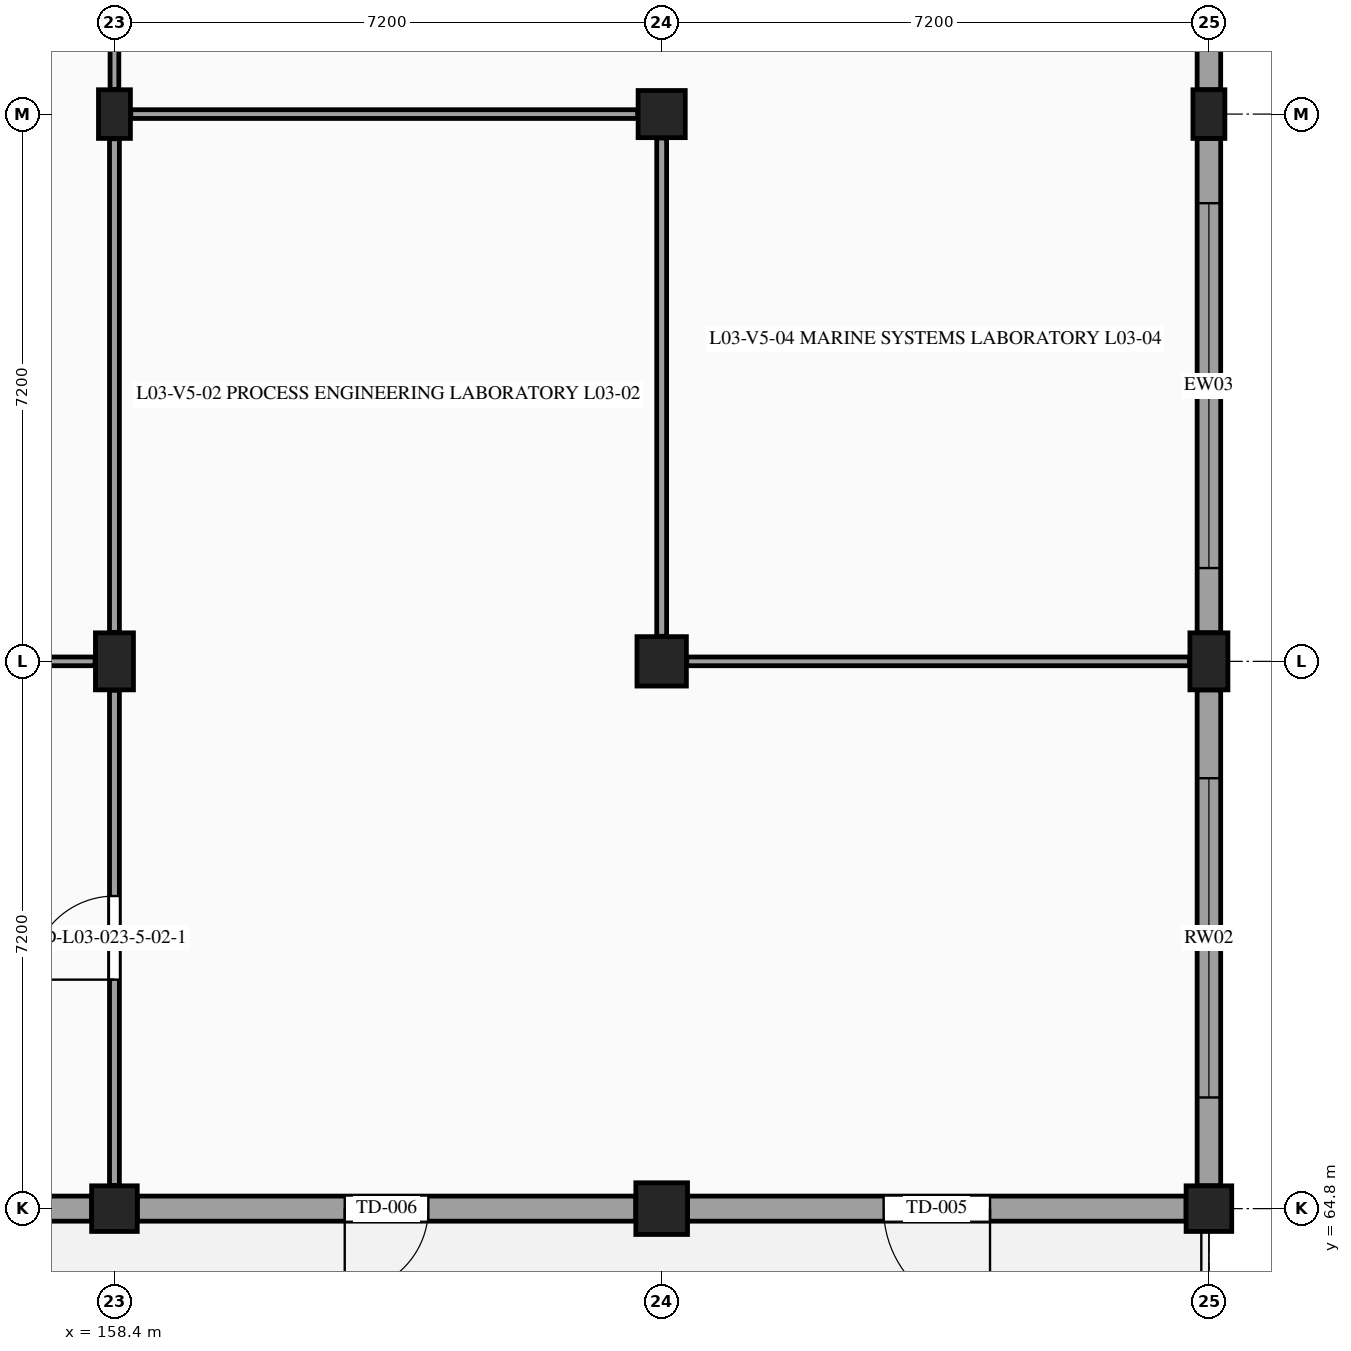
"""IFC4 building model, lengths in metres.
Left out: names, types, materials, properties, quantities, classifications, styles, units other than length and angle.
Written with IfcOpenShell. Run it as: python <this file> out.ifc"""

import sys

from ifc_helpers import new_model, si_unit, direction, frame, frame_2d, origin, origin_2d, place, context, subcontext, project, spatial, rectangle, extrude, element, fill, save


model = new_model("IFC4")
c1 = context("Model", 3, precision=1e-05, world=origin(), true_north=direction((0.0, 1.0)))
c2 = subcontext(c1, "Body", "Model", "MODEL_VIEW")
j1 = project(units=[si_unit("LENGTHUNIT", "METRE"), si_unit("PLANEANGLEUNIT", "RADIAN")], contexts=[c1])
p1 = place(None, origin())
s1 = spatial("IfcSite", under=j1, at=p1, CompositionType="ELEMENT")
p2 = place(p1, origin())
s2 = spatial("IfcBuilding", under=s1, at=p2, CompositionType="ELEMENT")
p3 = place(p2, frame((0.0, 0.0, 14.4)))
s3 = spatial("IfcBuildingStorey", under=s2, at=p3, CompositionType="ELEMENT", Elevation=14.4)
p4 = place(p3, frame((158.4, 64.8, 0.0), z_axis=(0.0, 0.0, 1.0), x_axis=(1.0, 0.0, 0.0)))
e1 = element("IfcColumn", 1, at=p4, inside=s3, PredefinedType="COLUMN", context=c2, shape_type="SweptSolid", body=[
    extrude(rectangle(XDim=0.6, YDim=0.6, at=origin_2d()), origin(), (0.0, 0.0, 1.0), 4.2),
])
p5 = place(p3, frame((158.4, 72.0, 0.0), z_axis=(0.0, 0.0, 1.0), x_axis=(1.0, 0.0, 0.0)))
e2 = element("IfcColumn", 2, at=p5, inside=s3, PredefinedType="COLUMN", context=c2, shape_type="SweptSolid", body=[
    extrude(rectangle(XDim=0.5, YDim=0.75, at=origin_2d()), origin(), (0.0, 0.0, 1.0), 4.2),
])
p6 = place(p3, frame((158.4, 79.2, 0.0), z_axis=(0.0, 0.0, 1.0), x_axis=(1.0, 0.0, 0.0)))
e3 = element("IfcColumn", 3, at=p6, inside=s3, PredefinedType="PILASTER", context=c2, shape_type="SweptSolid", body=[
    extrude(rectangle(XDim=0.42, YDim=0.64, at=origin_2d()), origin(), (0.0, 0.0, 1.0), 4.2),
])
p7 = place(p3, frame((165.6, 64.8, 0.0), z_axis=(0.0, 0.0, 1.0), x_axis=(1.0, 0.0, 0.0)))
e4 = element("IfcColumn", 4, at=p7, inside=s3, PredefinedType="COLUMN", context=c2, shape_type="SweptSolid", body=[
    extrude(rectangle(XDim=0.68, YDim=0.68, at=origin_2d()), origin(), (0.0, 0.0, 1.0), 4.2),
])
p8 = place(p3, frame((165.6, 72.0, 0.0), z_axis=(0.0, 0.0, 1.0), x_axis=(1.0, 0.0, 0.0)))
e5 = element("IfcColumn", 5, at=p8, inside=s3, PredefinedType="COLUMN", context=c2, shape_type="SweptSolid", body=[
    extrude(rectangle(XDim=0.65, YDim=0.65, at=origin_2d()), origin(), (0.0, 0.0, 1.0), 4.2),
])
p9 = place(p3, frame((165.6, 79.2, 0.0), z_axis=(0.0, 0.0, 1.0), x_axis=(1.0, 0.0, 0.0)))
e6 = element("IfcColumn", 6, at=p9, inside=s3, PredefinedType="COLUMN", context=c2, shape_type="SweptSolid", body=[
    extrude(rectangle(XDim=0.62, YDim=0.62, at=origin_2d()), origin(), (0.0, 0.0, 1.0), 4.2),
])
p10 = place(p3, frame((172.8, 64.8, 0.0), z_axis=(0.0, 0.0, 1.0), x_axis=(1.0, 0.0, 0.0)))
e7 = element("IfcColumn", 7, at=p10, inside=s3, PredefinedType="COLUMN", context=c2, shape_type="SweptSolid", body=[
    extrude(rectangle(XDim=0.6, YDim=0.6, at=origin_2d()), origin(), (0.0, 0.0, 1.0), 4.2),
])
p11 = place(p3, frame((172.8, 72.0, 0.0), z_axis=(0.0, 0.0, 1.0), x_axis=(1.0, 0.0, 0.0)))
e8 = element("IfcColumn", 8, at=p11, inside=s3, PredefinedType="COLUMN", context=c2, shape_type="SweptSolid", body=[
    extrude(rectangle(XDim=0.5, YDim=0.75, at=origin_2d()), origin(), (0.0, 0.0, 1.0), 4.2),
])
p12 = place(p3, frame((172.8, 79.2, 0.0), z_axis=(0.0, 0.0, 1.0), x_axis=(1.0, 0.0, 0.0)))
e9 = element("IfcColumn", 9, at=p12, inside=s3, PredefinedType="PILASTER", context=c2, shape_type="SweptSolid", body=[
    extrude(rectangle(XDim=0.42, YDim=0.64, at=origin_2d()), origin(), (0.0, 0.0, 1.0), 4.2),
])
p13 = place(p3, frame((172.8, 86.06, 0.0), z_axis=(0.0, 0.0, 1.0), x_axis=(0.0, -1.0, 0.0)))
e10 = element("IfcWall", 10, at=p13, inside=s3, PredefinedType="STANDARD", context=c2, shape_type="SweptSolid", body=[
    extrude(rectangle(XDim=6.54, YDim=0.31, at=frame_2d((3.27, 0.0))), origin(), (0.0, 0.0, 1.0), 3.135),
])
p14 = place(p13, frame((2.22, 0.0, 0.98)))
e11 = element("IfcOpeningElement", 11, at=p14, cuts=e10, PredefinedType="OPENING", context=c2, shape_type="SweptSolid", body=[
    extrude(rectangle(XDim=2.1, YDim=1.3, at=frame_2d((1.05, 0.65))), frame((0.0, 0.165, 0.0), z_axis=(0.0, -1.0, 0.0), x_axis=(1.0, 0.0, 0.0)), (0.0, 0.0, 1.0), 0.33),
])
p15 = place(p3, frame((172.8, 78.88, 0.0), z_axis=(0.0, 0.0, 1.0), x_axis=(0.0, -1.0, 0.0)))
e12 = element("IfcWall", 12, at=p15, inside=s3, PredefinedType="STANDARD", context=c2, shape_type="SweptSolid", body=[
    extrude(rectangle(XDim=6.505, YDim=0.31, at=frame_2d((3.252, 0.0))), origin(), (0.0, 0.0, 1.0), 3.135),
])
p16 = place(p15, frame((0.853, 0.0, 0.98)))
e13 = element("IfcOpeningElement", 13, at=p16, cuts=e12, PredefinedType="OPENING", context=c2, shape_type="SweptSolid", body=[
    extrude(rectangle(XDim=4.8, YDim=1.5, at=frame_2d((2.4, 0.75))), frame((0.0, 0.165, 0.0), z_axis=(0.0, -1.0, 0.0), x_axis=(1.0, 0.0, 0.0)), (0.0, 0.0, 1.0), 0.33),
])
p17 = place(p3, frame((172.8, 71.625, 0.0), z_axis=(0.0, 0.0, 1.0), x_axis=(0.0, -1.0, 0.0)))
e14 = element("IfcWall", 14, at=p17, inside=s3, PredefinedType="STANDARD", context=c2, shape_type="SweptSolid", body=[
    extrude(rectangle(XDim=6.525, YDim=0.31, at=frame_2d((3.262, 0.0))), origin(), (0.0, 0.0, 1.0), 3.11),
])
p18 = place(p17, frame((1.163, 0.0, 0.98)))
e15 = element("IfcOpeningElement", 15, at=p18, cuts=e14, PredefinedType="OPENING", context=c2, shape_type="SweptSolid", body=[
    extrude(rectangle(XDim=4.2, YDim=1.5, at=frame_2d((2.1, 0.75))), frame((0.0, 0.165, 0.0), z_axis=(0.0, -1.0, 0.0), x_axis=(1.0, 0.0, 0.0)), (0.0, 0.0, 1.0), 0.33),
])
p19 = place(p3, frame((172.5, 64.8, 0.0), z_axis=(0.0, 0.0, 1.0), x_axis=(-1.0, 0.0, 0.0)))
e16 = element("IfcWall", 16, at=p19, inside=s3, PredefinedType="STANDARD", context=c2, shape_type="SweptSolid", body=[
    extrude(rectangle(XDim=6.56, YDim=0.33, at=frame_2d((3.28, 0.0))), origin(), (0.0, 0.0, 1.0), 3.16),
])
p20 = place(p19, frame((2.58, 0.0, 0.0)))
e17 = element("IfcOpeningElement", 17, at=p20, cuts=e16, PredefinedType="OPENING", context=c2, shape_type="SweptSolid", body=[
    extrude(rectangle(XDim=1.4, YDim=2.25, at=frame_2d((0.7, 1.125))), frame((0.0, 0.175, 0.0), z_axis=(0.0, -1.0, 0.0), x_axis=(1.0, 0.0, 0.0)), (0.0, 0.0, 1.0), 0.35),
])
p21 = place(p3, frame((165.26, 64.8, 0.0), z_axis=(0.0, 0.0, 1.0), x_axis=(-1.0, 0.0, 0.0)))
e18 = element("IfcWall", 18, at=p21, inside=s3, PredefinedType="STANDARD", context=c2, shape_type="SweptSolid", body=[
    extrude(rectangle(XDim=6.56, YDim=0.33, at=frame_2d((3.28, 0.0))), origin(), (0.0, 0.0, 1.0), 3.16),
])
p22 = place(p21, frame((2.73, 0.0, 0.0)))
e19 = element("IfcOpeningElement", 19, at=p22, cuts=e18, PredefinedType="OPENING", context=c2, shape_type="SweptSolid", body=[
    extrude(rectangle(XDim=1.1, YDim=2.2, at=frame_2d((0.55, 1.1))), frame((0.0, 0.175, 0.0), z_axis=(0.0, -1.0, 0.0), x_axis=(1.0, 0.0, 0.0)), (0.0, 0.0, 1.0), 0.35),
])
p23 = place(p3, frame((158.1, 64.8, 0.0), z_axis=(0.0, 0.0, 1.0), x_axis=(-1.0, 0.0, 0.0)))
e20 = element("IfcWall", 20, at=p23, inside=s3, PredefinedType="STANDARD", context=c2, shape_type="SweptSolid", body=[
    extrude(rectangle(XDim=6.56, YDim=0.33, at=frame_2d((3.28, 0.0))), origin(), (0.0, 0.0, 1.0), 3.16),
])
p24 = place(p23, frame((1.68, 0.0, 0.95)))
e21 = element("IfcOpeningElement", 21, at=p24, cuts=e20, PredefinedType="OPENING", context=c2, shape_type="SweptSolid", body=[
    extrude(rectangle(XDim=3.2, YDim=1.45, at=frame_2d((1.6, 0.725))), frame((0.0, 0.175, 0.0), z_axis=(0.0, -1.0, 0.0), x_axis=(1.0, 0.0, 0.0)), (0.0, 0.0, 1.0), 0.35),
])
p25 = place(p3, frame((158.4, 65.105, 0.0), z_axis=(0.0, 0.0, 1.0), x_axis=(0.0, 1.0, 0.0)))
e22 = element("IfcWall", 22, at=p25, inside=s3, PredefinedType="PARTITIONING", context=c2, shape_type="SweptSolid", body=[
    extrude(rectangle(XDim=6.515, YDim=0.13, at=frame_2d((3.258, 0.0))), origin(), (0.0, 0.0, 1.0), 3.22),
])
p26 = place(p25, frame((2.708, 0.0, 0.0)))
e23 = element("IfcOpeningElement", 23, at=p26, cuts=e22, PredefinedType="OPENING", context=c2, shape_type="SweptSolid", body=[
    extrude(rectangle(XDim=1.1, YDim=2.15, at=frame_2d((0.55, 1.075))), frame((0.0, 0.075, 0.0), z_axis=(0.0, -1.0, 0.0), x_axis=(1.0, 0.0, 0.0)), (0.0, 0.0, 1.0), 0.15),
])
p27 = place(p3, frame((151.53, 72.0, 0.0), z_axis=(0.0, 0.0, 1.0), x_axis=(1.0, 0.0, 0.0)))
e24 = element("IfcWall", 24, at=p27, inside=s3, PredefinedType="PARTITIONING", context=c2, shape_type="SweptSolid", body=[
    extrude(rectangle(XDim=6.615, YDim=0.115, at=frame_2d((3.308, 0.0))), origin(), (0.0, 0.0, 1.0), 3.195),
])
p28 = place(p3, frame((158.4, 72.38, 0.0), z_axis=(0.0, 0.0, 1.0), x_axis=(0.0, 1.0, 0.0)))
e25 = element("IfcWall", 25, at=p28, inside=s3, PredefinedType="PARTITIONING", context=c2, shape_type="SweptSolid", body=[
    extrude(rectangle(XDim=6.495, YDim=0.13, at=frame_2d((3.248, 0.0))), origin(), (0.0, 0.0, 1.0), 3.31),
])
p29 = place(p3, frame((158.4, 79.525, 0.0), z_axis=(0.0, 0.0, 1.0), x_axis=(0.0, 1.0, 0.0)))
e26 = element("IfcWall", 26, at=p29, inside=s3, PredefinedType="PARTITIONING", context=c2, shape_type="SweptSolid", body=[
    extrude(rectangle(XDim=6.53, YDim=0.115, at=frame_2d((3.265, 0.0))), origin(), (0.0, 0.0, 1.0), 3.305),
])
p30 = place(p29, frame((2.305, 0.0, 0.0)))
e27 = element("IfcOpeningElement", 27, at=p30, cuts=e26, PredefinedType="OPENING", context=c2, shape_type="SweptSolid", body=[
    extrude(rectangle(XDim=1.92, YDim=2.35, at=frame_2d((0.96, 1.175))), frame((0.0, 0.067, 0.0), z_axis=(0.0, -1.0, 0.0), x_axis=(1.0, 0.0, 0.0)), (0.0, 0.0, 1.0), 0.135),
])
p31 = place(p3, frame((165.6, 72.33, 0.0), z_axis=(0.0, 0.0, 1.0), x_axis=(0.0, 1.0, 0.0)))
e28 = element("IfcWall", 28, at=p31, inside=s3, PredefinedType="PARTITIONING", context=c2, shape_type="SweptSolid", body=[
    extrude(rectangle(XDim=6.555, YDim=0.13, at=frame_2d((3.277, 0.0))), origin(), (0.0, 0.0, 1.0), 3.31),
])
p32 = place(p3, frame((158.615, 79.2, 0.0), z_axis=(0.0, 0.0, 1.0), x_axis=(1.0, 0.0, 0.0)))
e29 = element("IfcWall", 29, at=p32, inside=s3, PredefinedType="PARTITIONING", context=c2, shape_type="SweptSolid", body=[
    extrude(rectangle(XDim=6.67, YDim=0.115, at=frame_2d((3.335, 0.0))), origin(), (0.0, 0.0, 1.0), 3.24),
])
p33 = place(p3, frame((165.93, 72.0, 0.0), z_axis=(0.0, 0.0, 1.0), x_axis=(1.0, 0.0, 0.0)))
e30 = element("IfcWall", 30, at=p33, inside=s3, PredefinedType="PARTITIONING", context=c2, shape_type="SweptSolid", body=[
    extrude(rectangle(XDim=6.615, YDim=0.115, at=frame_2d((3.308, 0.0))), origin(), (0.0, 0.0, 1.0), 3.255),
])
p34 = place(p16, origin())
e31 = element("IfcWindow", 31, at=p34, inside=s3, PartitioningType="SINGLE_PANEL", PredefinedType="WINDOW", context=c2, shape_type="SweptSolid", body=[
    extrude(rectangle(XDim=4.8, YDim=1.5, at=frame_2d((2.4, 0.75))), frame((0.0, -0.03, 0.0), z_axis=(0.0, -1.0, 0.0), x_axis=(1.0, 0.0, 0.0)), (0.0, 0.0, 1.0), 0.06),
])
fill(e13, e31)
p35 = place(p18, origin())
e32 = element("IfcWindow", 32, at=p35, inside=s3, PartitioningType="SINGLE_PANEL", PredefinedType="WINDOW", context=c2, shape_type="SweptSolid", body=[
    extrude(rectangle(XDim=4.2, YDim=1.5, at=frame_2d((2.1, 0.75))), frame((0.0, -0.03, 0.0), z_axis=(0.0, -1.0, 0.0), x_axis=(1.0, 0.0, 0.0)), (0.0, 0.0, 1.0), 0.06),
])
fill(e15, e32)
p36 = place(p20, origin())
e33 = element("IfcDoor", 33, at=p36, inside=s3, OperationType="SINGLE_SWING_LEFT", PredefinedType="DOOR", context=c2, shape_type="SweptSolid", body=[
    extrude(rectangle(XDim=1.4, YDim=2.25, at=frame_2d((0.7, 1.125))), frame((0.0, 0.025, 0.0), z_axis=(0.0, -1.0, 0.0), x_axis=(1.0, 0.0, 0.0)), (0.0, 0.0, 1.0), 0.05),
])
fill(e17, e33)
p37 = place(p22, origin())
e34 = element("IfcDoor", 34, at=p37, inside=s3, OperationType="SINGLE_SWING_RIGHT", PredefinedType="DOOR", context=c2, shape_type="SweptSolid", body=[
    extrude(rectangle(XDim=1.1, YDim=2.2, at=frame_2d((0.55, 1.1))), frame((0.0, 0.025, 0.0), z_axis=(0.0, -1.0, 0.0), x_axis=(1.0, 0.0, 0.0)), (0.0, 0.0, 1.0), 0.05),
])
fill(e19, e34)
p38 = place(p26, origin())
e35 = element("IfcDoor", 35, at=p38, inside=s3, OperationType="SINGLE_SWING_LEFT", PredefinedType="DOOR", context=c2, shape_type="SweptSolid", body=[
    extrude(rectangle(XDim=1.1, YDim=2.15, at=frame_2d((0.55, 1.075))), frame((0.0, 0.025, 0.0), z_axis=(0.0, -1.0, 0.0), x_axis=(1.0, 0.0, 0.0)), (0.0, 0.0, 1.0), 0.05),
])
fill(e23, e35)
save(model, sys.argv[1])
